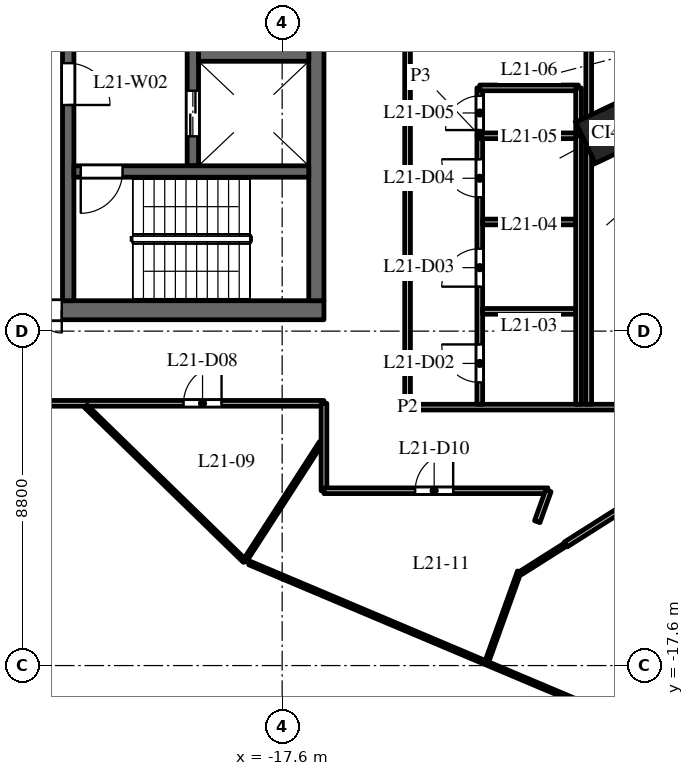
"""IFC4 building model, lengths in metres.
Left out: names, types, materials, properties, quantities, classifications, styles, units other than length and angle.
Written with IfcOpenShell. Run it as: python <this file> out.ifc"""

import sys

from ifc_helpers import new_model, si_unit, direction, frame, frame_2d, origin, origin_2d, place, context, subcontext, project, spatial, rectangle, extrude, element, fill, save


model = new_model("IFC4")
c1 = context("Model", 3, precision=1e-05, world=origin(), true_north=direction((0.0, 1.0)))
c2 = subcontext(c1, "Body", "Model", "MODEL_VIEW")
j1 = project(units=[si_unit("LENGTHUNIT", "METRE"), si_unit("PLANEANGLEUNIT", "RADIAN")], contexts=[c1])
p1 = place(None, origin())
s1 = spatial("IfcSite", under=j1, at=p1, CompositionType="ELEMENT")
p2 = place(p1, origin())
s2 = spatial("IfcBuilding", under=s1, at=p2, CompositionType="ELEMENT")
p3 = place(p2, frame((0.0, 0.0, 96.0)))
s3 = spatial("IfcBuildingStorey", under=s2, at=p3, CompositionType="ELEMENT", Elevation=96.0)
p4 = place(p3, frame((-9.076, -3.588, 0.0), z_axis=(0.0, 0.0, 1.0), x_axis=(0.428666979171, -0.903462573087, 0.0)))
e1 = element("IfcColumn", 1, at=p4, inside=s3, PredefinedType="COLUMN", context=c2, shape_type="SweptSolid", body=[
    extrude(rectangle(XDim=1.2, YDim=1.2, at=origin_2d()), origin(), (0.0, 0.0, 1.0), 4.0),
])
p5 = place(p3, frame((-16.5, -8.25, 0.0), z_axis=(0.0, 0.0, 1.0), x_axis=(-1.0, 0.0, 0.0)))
e2 = element("IfcWall", 2, at=p5, inside=s3, PredefinedType="SHEAR", context=c2, shape_type="SweptSolid", body=[
    extrude(rectangle(XDim=15.0, YDim=0.5, at=frame_2d((7.5, 0.0))), origin(), (0.0, 0.0, 1.0), 3.7),
])
p6 = place(p5, frame((6.9, 0.0, 0.0)))
e3 = element("IfcOpeningElement", 3, at=p6, cuts=e2, PredefinedType="OPENING", context=c2, shape_type="SweptSolid", body=[
    extrude(rectangle(XDim=1.2, YDim=2.1, at=frame_2d((0.6, 1.05))), frame((0.0, 0.26, 0.0), z_axis=(0.0, -1.0, 0.0), x_axis=(1.0, 0.0, 0.0)), (0.0, 0.0, 1.0), 0.52),
])
p7 = place(p5, frame((12.95, 0.0, 0.0)))
e4 = element("IfcOpeningElement", 4, at=p7, cuts=e2, PredefinedType="OPENING", context=c2, shape_type="SweptSolid", body=[
    extrude(rectangle(XDim=0.9, YDim=2.1, at=frame_2d((0.45, 1.05))), frame((0.0, 0.26, 0.0), z_axis=(0.0, -1.0, 0.0), x_axis=(1.0, 0.0, 0.0)), (0.0, 0.0, 1.0), 0.52),
])
p8 = place(p3, frame((-19.95, -4.45, 0.0), z_axis=(0.0, 0.0, 1.0), x_axis=(0.0, 1.0, 0.0)))
e5 = element("IfcWall", 5, at=p8, inside=s3, PredefinedType="SHEAR", context=c2, shape_type="SweptSolid", body=[
    extrude(rectangle(XDim=8.9, YDim=0.3, at=frame_2d((4.45, 0.0))), origin(), (0.0, 0.0, 1.0), 3.7),
])
p9 = place(p8, frame((0.775, 0.0, 0.0)))
e6 = element("IfcOpeningElement", 6, at=p9, cuts=e5, PredefinedType="OPENING", context=c2, shape_type="SweptSolid", body=[
    extrude(rectangle(XDim=1.2, YDim=2.1, at=frame_2d((0.6, 1.05))), frame((0.0, 0.16, 0.0), z_axis=(0.0, -1.0, 0.0), x_axis=(1.0, 0.0, 0.0)), (0.0, 0.0, 1.0), 0.32),
])
p10 = place(p8, frame((7.35, 0.0, 0.0)))
e7 = element("IfcOpeningElement", 7, at=p10, cuts=e5, PredefinedType="OPENING", context=c2, shape_type="SweptSolid", body=[
    extrude(rectangle(XDim=0.9, YDim=2.1, at=frame_2d((0.45, 1.05))), frame((0.0, 0.16, 0.0), z_axis=(0.0, -1.0, 0.0), x_axis=(1.0, 0.0, 0.0)), (0.0, 0.0, 1.0), 0.32),
])
p11 = place(p3, frame((-16.7, -8.0, 0.0), z_axis=(0.0, 0.0, 1.0), x_axis=(0.0, 1.0, 0.0)))
e8 = element("IfcWall", 8, at=p11, inside=s3, PredefinedType="SHEAR", context=c2, shape_type="SweptSolid", body=[
    extrude(rectangle(XDim=16.0, YDim=0.4, at=frame_2d((8.0, 0.0))), origin(), (0.0, 0.0, 1.0), 3.7),
])
p12 = place(p3, frame((-16.9, -1.075, 0.0), z_axis=(0.0, 0.0, 1.0), x_axis=(-1.0, 0.0, 0.0)))
e9 = element("IfcWall", 9, at=p12, inside=s3, PredefinedType="SHEAR", context=c2, shape_type="SweptSolid", body=[
    extrude(rectangle(XDim=2.9, YDim=1.25, at=frame_2d((1.45, 0.0))), origin(), (0.0, 0.0, 1.0), 3.7),
])
p13 = place(p3, frame((-23.23, -8.0, 0.0), z_axis=(0.0, 0.0, 1.0), x_axis=(0.0, 1.0, 0.0)))
e10 = element("IfcWall", 10, at=p13, inside=s3, PredefinedType="SHEAR", context=c2, shape_type="SweptSolid", body=[
    extrude(rectangle(XDim=7.875, YDim=0.3, at=frame_2d((3.938, 0.0))), origin(), (0.0, 0.0, 1.0), 3.7),
])
p14 = place(p13, frame((5.15, 0.0, 0.0)))
e11 = element("IfcOpeningElement", 11, at=p14, cuts=e10, PredefinedType="OPENING", context=c2, shape_type="SweptSolid", body=[
    extrude(rectangle(XDim=1.1, YDim=2.1, at=frame_2d((0.55, 1.05))), frame((0.0, 0.16, 0.0), z_axis=(0.0, -1.0, 0.0), x_axis=(1.0, 0.0, 0.0)), (0.0, 0.0, 1.0), 0.32),
])
p15 = place(p3, frame((-16.9, -4.6, 0.0), z_axis=(0.0, 0.0, 1.0), x_axis=(-1.0, 0.0, 0.0)))
e12 = element("IfcWall", 12, at=p15, inside=s3, PredefinedType="SHEAR", context=c2, shape_type="SweptSolid", body=[
    extrude(rectangle(XDim=6.18, YDim=0.3, at=frame_2d((3.09, 0.0))), origin(), (0.0, 0.0, 1.0), 3.7),
])
p16 = place(p15, frame((4.9, 0.0, 0.0)))
e13 = element("IfcOpeningElement", 13, at=p16, cuts=e12, PredefinedType="OPENING", context=c2, shape_type="SweptSolid", body=[
    extrude(rectangle(XDim=1.1, YDim=2.1, at=frame_2d((0.55, 1.05))), frame((0.0, 0.16, 0.0), z_axis=(0.0, -1.0, 0.0), x_axis=(1.0, 0.0, 0.0)), (0.0, 0.0, 1.0), 0.32),
])
p17 = place(p3, frame((-31.5, -10.7, 0.0), z_axis=(0.0, 0.0, 1.0), x_axis=(1.0, 0.0, 0.0)))
e14 = element("IfcWall", 14, at=p17, inside=s3, PredefinedType="PARTITIONING", context=c2, shape_type="SweptSolid", body=[
    extrude(rectangle(XDim=15.0, YDim=0.15, at=frame_2d((7.5, 0.0))), origin(), (0.0, 0.0, 1.0), 3.1),
])
p18 = place(p17, frame((3.9, 0.0, 0.0)))
e15 = element("IfcOpeningElement", 15, at=p18, cuts=e14, PredefinedType="OPENING", context=c2, shape_type="SweptSolid", body=[
    extrude(rectangle(XDim=1.0, YDim=2.1, at=frame_2d((0.5, 1.05))), frame((0.0, 0.085, 0.0), z_axis=(0.0, -1.0, 0.0), x_axis=(1.0, 0.0, 0.0)), (0.0, 0.0, 1.0), 0.17),
])
p19 = place(p17, frame((11.305, 0.0, 0.0)))
e16 = element("IfcOpeningElement", 16, at=p19, cuts=e14, PredefinedType="OPENING", context=c2, shape_type="SweptSolid", body=[
    extrude(rectangle(XDim=1.0, YDim=2.1, at=frame_2d((0.5, 1.05))), frame((0.0, 0.085, 0.0), z_axis=(0.0, -1.0, 0.0), x_axis=(1.0, 0.0, 0.0)), (0.0, 0.0, 1.0), 0.17),
])
p20 = place(p3, frame((-22.765, -10.778, 0.0), z_axis=(0.0, 0.0, 1.0), x_axis=(0.716294479598, -0.697798121592, 0.0)))
e17 = element("IfcWall", 17, at=p20, inside=s3, PredefinedType="PARTITIONING", context=c2, shape_type="SweptSolid", body=[
    extrude(rectangle(XDim=5.834, YDim=0.1, at=frame_2d((2.917, 0.0))), origin(), (0.0, 0.0, 1.0), 2.75),
])
p21 = place(p3, frame((-18.586, -14.849, 0.0), z_axis=(0.0, 0.0, 1.0), x_axis=(0.542227325377, 0.840231829684, 0.0)))
e18 = element("IfcWall", 18, at=p21, inside=s3, PredefinedType="PARTITIONING", context=c2, shape_type="SweptSolid", body=[
    extrude(rectangle(XDim=3.709, YDim=0.1, at=frame_2d((1.854, 0.0))), origin(), (0.0, 0.0, 1.0), 2.75),
])
p22 = place(p3, frame((-18.46, -14.902, 0.0), z_axis=(0.0, 0.0, 1.0), x_axis=(0.921302833786, -0.388845841508, 0.0)))
e19 = element("IfcWall", 19, at=p22, inside=s3, PredefinedType="PARTITIONING", context=c2, shape_type="SweptSolid", body=[
    extrude(rectangle(XDim=10.472, YDim=0.1, at=frame_2d((5.236, 0.0))), origin(), (0.0, 0.0, 1.0), 2.85),
])
p23 = place(p3, frame((-16.5, -13.0, 0.0), z_axis=(0.0, 0.0, 1.0), x_axis=(0.0, 1.0, 0.0)))
e20 = element("IfcWall", 20, at=p23, inside=s3, PredefinedType="PARTITIONING", context=c2, shape_type="SweptSolid", body=[
    extrude(rectangle(XDim=2.3, YDim=0.15, at=frame_2d((1.15, 0.0))), origin(), (0.0, 0.0, 1.0), 2.75),
])
p24 = place(p3, frame((-16.5, -13.0, 0.0), z_axis=(0.0, 0.0, 1.0), x_axis=(1.0, 0.0, 0.0)))
e21 = element("IfcWall", 21, at=p24, inside=s3, PredefinedType="PARTITIONING", context=c2, shape_type="SweptSolid", body=[
    extrude(rectangle(XDim=5.893, YDim=0.15, at=frame_2d((2.947, 0.0))), origin(), (0.0, 0.0, 1.0), 2.85),
])
p25 = place(p24, frame((2.4, 0.0, 0.0)))
e22 = element("IfcOpeningElement", 22, at=p25, cuts=e21, PredefinedType="OPENING", context=c2, shape_type="SweptSolid", body=[
    extrude(rectangle(XDim=1.0, YDim=2.1, at=frame_2d((0.5, 1.05))), frame((0.0, 0.085, 0.0), z_axis=(0.0, -1.0, 0.0), x_axis=(1.0, 0.0, 0.0)), (0.0, 0.0, 1.0), 0.17),
])
p26 = place(p3, frame((-14.3, -10.8, 0.0), z_axis=(0.0, 0.0, 1.0), x_axis=(0.0, 1.0, 0.0)))
e23 = element("IfcWall", 23, at=p26, inside=s3, PredefinedType="PARTITIONING", context=c2, shape_type="SweptSolid", body=[
    extrude(rectangle(XDim=21.6, YDim=0.15, at=frame_2d((10.8, 0.0))), origin(), (0.0, 0.0, 1.0), 2.75),
])
p27 = place(p26, frame((10.4, 0.0, 0.0)))
e24 = element("IfcOpeningElement", 24, at=p27, cuts=e23, PredefinedType="OPENING", context=c2, shape_type="SweptSolid", body=[
    extrude(rectangle(XDim=1.0, YDim=2.1, at=frame_2d((0.5, 1.05))), frame((0.0, 0.085, 0.0), z_axis=(0.0, -1.0, 0.0), x_axis=(1.0, 0.0, 0.0)), (0.0, 0.0, 1.0), 0.17),
])
p28 = place(p3, frame((-14.3, -10.8, 0.0), z_axis=(0.0, 0.0, 1.0), x_axis=(1.0, 0.0, 0.0)))
e25 = element("IfcWall", 25, at=p28, inside=s3, PredefinedType="PARTITIONING", context=c2, shape_type="SweptSolid", body=[
    extrude(rectangle(XDim=28.6, YDim=0.15, at=frame_2d((14.3, 0.0))), origin(), (0.0, 0.0, 1.0), 2.85),
])
p29 = place(p28, frame((11.4, 0.0, 0.0)))
e26 = element("IfcOpeningElement", 26, at=p29, cuts=e25, PredefinedType="OPENING", context=c2, shape_type="SweptSolid", body=[
    extrude(rectangle(XDim=1.0, YDim=2.1, at=frame_2d((0.5, 1.05))), frame((0.0, 0.085, 0.0), z_axis=(0.0, -1.0, 0.0), x_axis=(1.0, 0.0, 0.0)), (0.0, 0.0, 1.0), 0.17),
])
p30 = place(p28, frame((16.167, 0.0, 0.0)))
e27 = element("IfcOpeningElement", 27, at=p30, cuts=e25, PredefinedType="OPENING", context=c2, shape_type="SweptSolid", body=[
    extrude(rectangle(XDim=1.0, YDim=2.1, at=frame_2d((0.5, 1.05))), frame((0.0, 0.085, 0.0), z_axis=(0.0, -1.0, 0.0), x_axis=(1.0, 0.0, 0.0)), (0.0, 0.0, 1.0), 0.17),
])
p31 = place(p3, frame((-12.4, -10.725, 0.0), z_axis=(0.0, 0.0, 1.0), x_axis=(0.0, 1.0, 0.0)))
e28 = element("IfcWall", 28, at=p31, inside=s3, PredefinedType="PARTITIONING", context=c2, shape_type="SweptSolid", body=[
    extrude(rectangle(XDim=7.065, YDim=0.15, at=frame_2d((3.533, 0.0))), origin(), (0.0, 0.0, 1.0), 2.75),
])
p32 = place(p31, frame((0.575, 0.0, 0.0)))
e29 = element("IfcOpeningElement", 29, at=p32, cuts=e28, PredefinedType="OPENING", context=c2, shape_type="SweptSolid", body=[
    extrude(rectangle(XDim=1.0, YDim=2.1, at=frame_2d((0.5, 1.05))), frame((0.0, 0.085, 0.0), z_axis=(0.0, -1.0, 0.0), x_axis=(1.0, 0.0, 0.0)), (0.0, 0.0, 1.0), 0.17),
])
p33 = place(p31, frame((3.095, 0.0, 0.0)))
e30 = element("IfcOpeningElement", 30, at=p33, cuts=e28, PredefinedType="OPENING", context=c2, shape_type="SweptSolid", body=[
    extrude(rectangle(XDim=1.0, YDim=2.1, at=frame_2d((0.5, 1.05))), frame((0.0, 0.085, 0.0), z_axis=(0.0, -1.0, 0.0), x_axis=(1.0, 0.0, 0.0)), (0.0, 0.0, 1.0), 0.17),
])
p34 = place(p31, frame((5.447, 0.0, 0.0)))
e31 = element("IfcOpeningElement", 31, at=p34, cuts=e28, PredefinedType="OPENING", context=c2, shape_type="SweptSolid", body=[
    extrude(rectangle(XDim=1.0, YDim=2.1, at=frame_2d((0.5, 1.05))), frame((0.0, 0.085, 0.0), z_axis=(0.0, -1.0, 0.0), x_axis=(1.0, 0.0, 0.0)), (0.0, 0.0, 1.0), 0.17),
])
p35 = place(p3, frame((-12.325, -8.28, 0.0), z_axis=(0.0, 0.0, 1.0), x_axis=(1.0, 0.0, 0.0)))
e32 = element("IfcWall", 32, at=p35, inside=s3, PredefinedType="PARTITIONING", context=c2, shape_type="SweptSolid", body=[
    extrude(rectangle(XDim=2.45, YDim=0.15, at=frame_2d((1.225, 0.0))), origin(), (0.0, 0.0, 1.0), 2.75),
])
p36 = place(p3, frame((-12.325, -5.928, 0.0), z_axis=(0.0, 0.0, 1.0), x_axis=(1.0, 0.0, 0.0)))
e33 = element("IfcWall", 33, at=p36, inside=s3, PredefinedType="PARTITIONING", context=c2, shape_type="SweptSolid", body=[
    extrude(rectangle(XDim=2.45, YDim=0.15, at=frame_2d((1.225, 0.0))), origin(), (0.0, 0.0, 1.0), 3.7),
])
p37 = place(p3, frame((-12.4, -3.66, 0.0), z_axis=(0.0, 0.0, 1.0), x_axis=(0.0, 1.0, 0.0)))
e34 = element("IfcWall", 34, at=p37, inside=s3, PredefinedType="PARTITIONING", context=c2, shape_type="SweptSolid", body=[
    extrude(rectangle(XDim=1.26, YDim=0.15, at=frame_2d((0.63, 0.0))), origin(), (0.0, 0.0, 1.0), 3.7),
])
p38 = place(p37, frame((0.15, 0.0, 0.0)))
e35 = element("IfcOpeningElement", 35, at=p38, cuts=e34, PredefinedType="OPENING", context=c2, shape_type="SweptSolid", body=[
    extrude(rectangle(XDim=0.9, YDim=2.1, at=frame_2d((0.45, 1.05))), frame((0.0, 0.085, 0.0), z_axis=(0.0, -1.0, 0.0), x_axis=(1.0, 0.0, 0.0)), (0.0, 0.0, 1.0), 0.17),
])
p39 = place(p3, frame((-12.4, -3.66, 0.0), z_axis=(0.0, 0.0, 1.0), x_axis=(1.0, 0.0, 0.0)))
e36 = element("IfcWall", 36, at=p39, inside=s3, PredefinedType="PARTITIONING", context=c2, shape_type="SweptSolid", body=[
    extrude(rectangle(XDim=2.6, YDim=0.15, at=frame_2d((1.3, 0.0))), origin(), (0.0, 0.0, 1.0), 3.7),
])
p40 = place(p3, frame((-12.4, -2.4, 0.0), z_axis=(0.0, 0.0, 1.0), x_axis=(1.0, 0.0, 0.0)))
e37 = element("IfcWall", 37, at=p40, inside=s3, PredefinedType="PARTITIONING", context=c2, shape_type="SweptSolid", body=[
    extrude(rectangle(XDim=2.596, YDim=0.15, at=frame_2d((1.298, 0.0))), origin(), (0.0, 0.0, 1.0), 3.7),
])
p41 = place(p3, frame((-12.209, -17.486, 0.0), z_axis=(0.0, 0.0, 1.0), x_axis=(0.338698771758, 0.940894862357, 0.0)))
e38 = element("IfcWall", 38, at=p41, inside=s3, PredefinedType="PARTITIONING", context=c2, shape_type="SweptSolid", body=[
    extrude(rectangle(XDim=2.506, YDim=0.1, at=frame_2d((1.253, 0.0))), origin(), (0.0, 0.0, 1.0), 3.7),
])
p42 = place(p3, frame((-11.319, -15.161, 0.0), z_axis=(0.0, 0.0, 1.0), x_axis=(0.845102975348, 0.534603555037, 0.0)))
e39 = element("IfcWall", 39, at=p42, inside=s3, PredefinedType="PARTITIONING", context=c2, shape_type="SweptSolid", body=[
    extrude(rectangle(XDim=1.399, YDim=0.1, at=frame_2d((0.699, 0.0))), origin(), (0.0, 0.0, 1.0), 3.7),
])
p43 = place(p3, frame((-10.888, -13.814, 0.0), z_axis=(0.0, 0.0, 1.0), x_axis=(0.338659506624, 0.940908995904, 0.0)))
e40 = element("IfcWall", 40, at=p43, inside=s3, PredefinedType="PARTITIONING", context=c2, shape_type="SweptSolid", body=[
    extrude(rectangle(XDim=0.865, YDim=0.15, at=frame_2d((0.433, 0.0))), origin(), (0.0, 0.0, 1.0), 2.85),
])
p44 = place(p3, frame((-10.137, -14.413, 0.0), z_axis=(0.0, 0.0, 1.0), x_axis=(0.844666662568, 0.535292657475, 0.0)))
e41 = element("IfcWall", 41, at=p44, inside=s3, PredefinedType="PARTITIONING", context=c2, shape_type="SweptSolid", body=[
    extrude(rectangle(XDim=2.776, YDim=0.15, at=frame_2d((1.388, 0.0))), origin(), (0.0, 0.0, 1.0), 3.7),
])
p45 = place(p3, frame((-9.8, -10.725, 0.0), z_axis=(0.0, 0.0, 1.0), x_axis=(0.0, 1.0, 0.0)))
e42 = element("IfcWall", 42, at=p45, inside=s3, PredefinedType="PARTITIONING", context=c2, shape_type="SweptSolid", body=[
    extrude(rectangle(XDim=7.065, YDim=0.15, at=frame_2d((3.533, 0.0))), origin(), (0.0, 0.0, 1.0), 2.75),
])
p46 = place(p3, frame((-9.8, -3.66, 0.0), z_axis=(0.0, 0.0, 1.0), x_axis=(0.0, 1.0, 0.0)))
e43 = element("IfcWall", 43, at=p46, inside=s3, PredefinedType="PARTITIONING", context=c2, shape_type="SweptSolid", body=[
    extrude(rectangle(XDim=1.256, YDim=0.15, at=frame_2d((0.628, 0.0))), origin(), (0.0, 0.0, 1.0), 3.7),
])
p47 = place(p3, frame((-9.533, -10.725, 0.0), z_axis=(0.0, 0.0, 1.0), x_axis=(0.0, 1.0, 0.0)))
e44 = element("IfcWall", 44, at=p47, inside=s3, PredefinedType="PARTITIONING", context=c2, shape_type="SweptSolid", body=[
    extrude(rectangle(XDim=21.45, YDim=0.15, at=frame_2d((10.725, 0.0))), origin(), (0.0, 0.0, 1.0), 2.75),
])
p48 = place(p47, frame((15.575, 0.0, 0.0)))
e45 = element("IfcOpeningElement", 45, at=p48, cuts=e44, PredefinedType="OPENING", context=c2, shape_type="SweptSolid", body=[
    extrude(rectangle(XDim=1.0, YDim=2.1, at=frame_2d((0.5, 1.05))), frame((0.0, 0.085, 0.0), z_axis=(0.0, -1.0, 0.0), x_axis=(1.0, 0.0, 0.0)), (0.0, 0.0, 1.0), 0.17),
])
p49 = place(p9, origin())
e46 = element("IfcDoor", 46, at=p49, inside=s3, OperationType="DOUBLE_DOOR_SLIDING", PredefinedType="DOOR", context=c2, shape_type="SweptSolid", body=[
    extrude(rectangle(XDim=1.2, YDim=2.1, at=frame_2d((0.6, 1.05))), frame((0.0, 0.025, 0.0), z_axis=(0.0, -1.0, 0.0), x_axis=(1.0, 0.0, 0.0)), (0.0, 0.0, 1.0), 0.05),
])
fill(e6, e46)
p50 = place(p16, origin())
e47 = element("IfcDoor", 47, at=p50, inside=s3, OperationType="SINGLE_SWING_LEFT", PredefinedType="DOOR", context=c2, shape_type="SweptSolid", body=[
    extrude(rectangle(XDim=1.1, YDim=2.1, at=frame_2d((0.55, 1.05))), frame((0.0, 0.025, 0.0), z_axis=(0.0, -1.0, 0.0), x_axis=(1.0, 0.0, 0.0)), (0.0, 0.0, 1.0), 0.05),
])
fill(e13, e47)
p51 = place(p14, origin())
e48 = element("IfcDoor", 48, at=p51, inside=s3, OperationType="SINGLE_SWING_LEFT", PredefinedType="DOOR", context=c2, shape_type="SweptSolid", body=[
    extrude(rectangle(XDim=1.1, YDim=2.1, at=frame_2d((0.55, 1.05))), frame((0.0, 0.025, 0.0), z_axis=(0.0, -1.0, 0.0), x_axis=(1.0, 0.0, 0.0)), (0.0, 0.0, 1.0), 0.05),
])
fill(e11, e48)
p52 = place(p6, origin())
e49 = element("IfcDoor", 49, at=p52, inside=s3, OperationType="DOUBLE_DOOR_DOUBLE_SWING", PredefinedType="DOOR", context=c2, shape_type="SweptSolid", body=[
    extrude(rectangle(XDim=1.2, YDim=2.1, at=frame_2d((0.6, 1.05))), frame((0.0, 0.025, 0.0), z_axis=(0.0, -1.0, 0.0), x_axis=(1.0, 0.0, 0.0)), (0.0, 0.0, 1.0), 0.05),
])
fill(e3, e49)
p53 = place(p32, origin())
e50 = element("IfcDoor", 50, at=p53, inside=s3, OperationType="SINGLE_SWING_RIGHT", PredefinedType="DOOR", context=c2, shape_type="SweptSolid", body=[
    extrude(rectangle(XDim=1.0, YDim=2.1, at=frame_2d((0.5, 1.05))), frame((0.0, 0.025, 0.0), z_axis=(0.0, -1.0, 0.0), x_axis=(1.0, 0.0, 0.0)), (0.0, 0.0, 1.0), 0.05),
])
fill(e29, e50)
p54 = place(p33, origin())
e51 = element("IfcDoor", 51, at=p54, inside=s3, OperationType="SINGLE_SWING_LEFT", PredefinedType="DOOR", context=c2, shape_type="SweptSolid", body=[
    extrude(rectangle(XDim=1.0, YDim=2.1, at=frame_2d((0.5, 1.05))), frame((0.0, 0.025, 0.0), z_axis=(0.0, -1.0, 0.0), x_axis=(1.0, 0.0, 0.0)), (0.0, 0.0, 1.0), 0.05),
])
fill(e30, e51)
p55 = place(p34, origin())
e52 = element("IfcDoor", 52, at=p55, inside=s3, OperationType="SINGLE_SWING_RIGHT", PredefinedType="DOOR", context=c2, shape_type="SweptSolid", body=[
    extrude(rectangle(XDim=1.0, YDim=2.1, at=frame_2d((0.5, 1.05))), frame((0.0, 0.025, 0.0), z_axis=(0.0, -1.0, 0.0), x_axis=(1.0, 0.0, 0.0)), (0.0, 0.0, 1.0), 0.05),
])
fill(e31, e52)
p56 = place(p38, origin())
e53 = element("IfcDoor", 53, at=p56, inside=s3, OperationType="SINGLE_SWING_LEFT", PredefinedType="DOOR", context=c2, shape_type="SweptSolid", body=[
    extrude(rectangle(XDim=0.9, YDim=2.1, at=frame_2d((0.45, 1.05))), frame((0.0, 0.025, 0.0), z_axis=(0.0, -1.0, 0.0), x_axis=(1.0, 0.0, 0.0)), (0.0, 0.0, 1.0), 0.05),
])
fill(e35, e53)
p57 = place(p19, origin())
e54 = element("IfcDoor", 54, at=p57, inside=s3, OperationType="SINGLE_SWING_RIGHT", PredefinedType="DOOR", context=c2, shape_type="SweptSolid", body=[
    extrude(rectangle(XDim=1.0, YDim=2.1, at=frame_2d((0.5, 1.05))), frame((0.0, 0.025, 0.0), z_axis=(0.0, -1.0, 0.0), x_axis=(1.0, 0.0, 0.0)), (0.0, 0.0, 1.0), 0.05),
])
fill(e16, e54)
p58 = place(p25, origin())
e55 = element("IfcDoor", 55, at=p58, inside=s3, OperationType="SINGLE_SWING_RIGHT", PredefinedType="DOOR", context=c2, shape_type="SweptSolid", body=[
    extrude(rectangle(XDim=1.0, YDim=2.1, at=frame_2d((0.5, 1.05))), frame((0.0, 0.025, 0.0), z_axis=(0.0, -1.0, 0.0), x_axis=(1.0, 0.0, 0.0)), (0.0, 0.0, 1.0), 0.05),
])
fill(e22, e55)
save(model, sys.argv[1])
